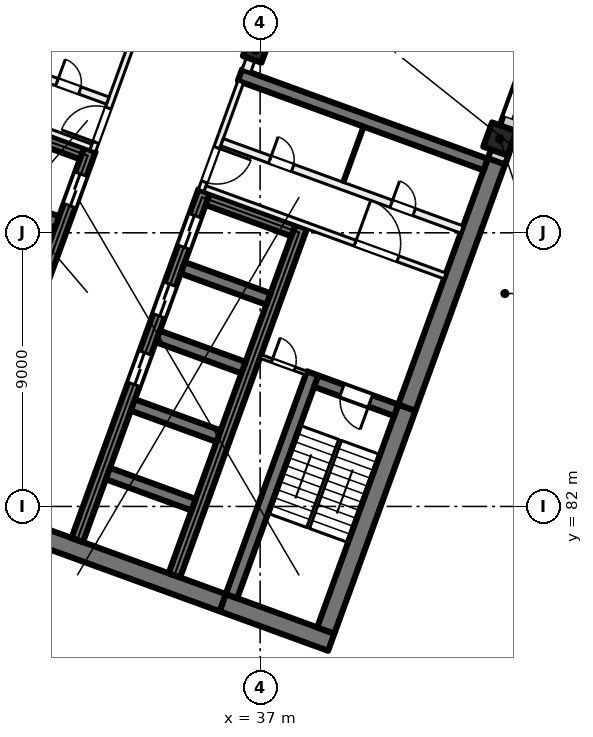
"""IFC4 building model, lengths in metres.
Left out: names, types, materials, properties, quantities, classifications, styles, units other than length and angle.
Written with IfcOpenShell. Run it as: python <this file> out.ifc"""

import sys

from ifc_helpers import new_model, si_unit, direction, frame, frame_2d, origin, origin_2d, place, context, subcontext, project, spatial, rectangle, extrude, element, fill, save


model = new_model("IFC4")
c1 = context("Model", 3, precision=1e-05, world=origin(), true_north=direction((0.0, 1.0)))
c2 = subcontext(c1, "Body", "Model", "MODEL_VIEW")
j1 = project(units=[si_unit("LENGTHUNIT", "METRE"), si_unit("PLANEANGLEUNIT", "RADIAN")], contexts=[c1])
p1 = place(None, origin())
s1 = spatial("IfcSite", under=j1, at=p1, CompositionType="ELEMENT")
p2 = place(p1, origin())
s2 = spatial("IfcBuilding", under=s1, at=p2, CompositionType="ELEMENT")
p3 = place(p2, frame((0.0, 0.0, 89.0)))
s3 = spatial("IfcBuildingStorey", under=s2, at=p3, CompositionType="ELEMENT", Elevation=89.0)
p4 = place(p3, frame((36.849, 97.011, 0.0), z_axis=(0.0, 0.0, 1.0), x_axis=(-0.342020143326, -0.939692620786, 0.0)))
e1 = element("IfcColumn", 1, at=p4, inside=s3, PredefinedType="COLUMN", context=c2, shape_type="SweptSolid", body=[
    extrude(rectangle(XDim=0.65, YDim=0.65, at=origin_2d()), origin(), (0.0, 0.0, 1.0), 4.0),
])
p5 = place(p3, frame((44.884, 94.087, 0.0), z_axis=(0.0, 0.0, 1.0), x_axis=(-0.342020143326, -0.939692620786, 0.0)))
e2 = element("IfcColumn", 2, at=p5, inside=s3, PredefinedType="COLUMN", context=c2, shape_type="SweptSolid", body=[
    extrude(rectangle(XDim=0.85, YDim=0.85, at=origin_2d()), origin(), (0.0, 0.0, 1.0), 4.0),
])
p6 = place(p3, frame((39.338, 77.535, 0.0), z_axis=(0.0, 0.0, 1.0), x_axis=(-0.939701471648, 0.341995824804, 0.0)))
e3 = element("IfcWall", 3, at=p6, inside=s3, PredefinedType="SHEAR", context=c2, shape_type="SweptSolid", body=[
    extrude(rectangle(XDim=3.8, YDim=0.6, at=frame_2d((1.9, 0.0))), origin(), (0.0, 0.0, 1.0), 4.0),
])
p7 = place(p3, frame((35.767, 78.835, 0.0), z_axis=(0.0, 0.0, 1.0), x_axis=(-0.939692894512, 0.342019391267, 0.0)))
e4 = element("IfcWall", 4, at=p7, inside=s3, PredefinedType="SHEAR", context=c2, shape_type="SweptSolid", body=[
    extrude(rectangle(XDim=14.4, YDim=0.6, at=frame_2d((7.2, 0.0))), origin(), (0.0, 0.0, 1.0), 4.0),
])
p8 = place(p3, frame((39.159, 77.92, 0.0), z_axis=(0.0, 0.0, 1.0), x_axis=(0.342016982193, 0.939693771338, 0.0)))
e5 = element("IfcWall", 5, at=p8, inside=s3, PredefinedType="SHEAR", context=c2, shape_type="SweptSolid", body=[
    extrude(rectangle(XDim=7.8, YDim=0.6, at=frame_2d((3.9, 0.0))), origin(), (0.0, 0.0, 1.0), 4.0),
])
p9 = place(p3, frame((41.827, 85.249, 0.0), z_axis=(0.0, 0.0, 1.0), x_axis=(0.342017595281, 0.939693548195, 0.0)))
e6 = element("IfcWall", 6, at=p9, inside=s3, PredefinedType="SHEAR", context=c2, shape_type="SweptSolid", body=[
    extrude(rectangle(XDim=8.925, YDim=0.6, at=frame_2d((4.462, 0.0))), origin(), (0.0, 0.0, 1.0), 4.0),
])
p10 = place(p3, frame((36.058, 79.048, 0.0), z_axis=(0.0, 0.0, 1.0), x_axis=(0.342016982193, 0.939693771338, 0.0)))
e7 = element("IfcWall", 7, at=p10, inside=s3, PredefinedType="SHEAR", context=c2, shape_type="SweptSolid", body=[
    extrude(rectangle(XDim=7.8, YDim=0.4, at=frame_2d((3.9, 0.0))), origin(), (0.0, 0.0, 1.0), 4.0),
])
p11 = place(p3, frame((41.476, 85.164, 0.0), z_axis=(0.0, 0.0, 1.0), x_axis=(-0.939678810556, 0.342058084236, 0.0)))
e8 = element("IfcWall", 8, at=p11, inside=s3, PredefinedType="SHEAR", context=c2, shape_type="SweptSolid", body=[
    extrude(rectangle(XDim=2.8, YDim=0.4, at=frame_2d((1.4, 0.0))), origin(), (0.0, 0.0, 1.0), 4.0),
])
p12 = place(p11, frame((0.9, 0.0, 0.0)))
e9 = element("IfcOpeningElement", 9, at=p12, cuts=e8, PredefinedType="OPENING", context=c2, shape_type="SweptSolid", body=[
    extrude(rectangle(XDim=1.0, YDim=2.1, at=frame_2d((0.5, 1.05))), frame((0.0, 0.21, 0.0), z_axis=(0.0, -1.0, 0.0), x_axis=(1.0, 0.0, 0.0)), (0.0, 0.0, 1.0), 0.42),
])
p13 = place(p3, frame((30.984, 80.895, 0.0), z_axis=(0.0, 0.0, 1.0), x_axis=(0.342021021735, 0.939692301071, 0.0)))
e10 = element("IfcWall", 10, at=p13, inside=s3, PredefinedType="SHEAR", context=c2, shape_type="SweptSolid", body=[
    extrude(rectangle(XDim=12.2, YDim=0.4, at=frame_2d((6.1, 0.0))), origin(), (0.0, 0.0, 1.0), 4.0),
])
p14 = place(p13, frame((5.45, 0.0, 0.0)))
e11 = element("IfcOpeningElement", 11, at=p14, cuts=e10, PredefinedType="OPENING", context=c2, shape_type="SweptSolid", body=[
    extrude(rectangle(XDim=1.1, YDim=2.1, at=frame_2d((0.55, 1.05))), frame((0.0, 0.21, 0.0), z_axis=(0.0, -1.0, 0.0), x_axis=(1.0, 0.0, 0.0)), (0.0, 0.0, 1.0), 0.42),
])
p15 = place(p13, frame((7.85, 0.0, 0.0)))
e12 = element("IfcOpeningElement", 12, at=p15, cuts=e10, PredefinedType="OPENING", context=c2, shape_type="SweptSolid", body=[
    extrude(rectangle(XDim=1.1, YDim=2.1, at=frame_2d((0.55, 1.05))), frame((0.0, 0.21, 0.0), z_axis=(0.0, -1.0, 0.0), x_axis=(1.0, 0.0, 0.0)), (0.0, 0.0, 1.0), 0.42),
])
p16 = place(p13, frame((10.25, 0.0, 0.0)))
e13 = element("IfcOpeningElement", 13, at=p16, cuts=e10, PredefinedType="OPENING", context=c2, shape_type="SweptSolid", body=[
    extrude(rectangle(XDim=1.1, YDim=2.1, at=frame_2d((0.55, 1.05))), frame((0.0, 0.21, 0.0), z_axis=(0.0, -1.0, 0.0), x_axis=(1.0, 0.0, 0.0)), (0.0, 0.0, 1.0), 0.42),
])
p17 = place(p3, frame((34.178, 79.732, 0.0), z_axis=(0.0, 0.0, 1.0), x_axis=(0.342014590177, 0.939694641948, 0.0)))
e14 = element("IfcWall", 14, at=p17, inside=s3, PredefinedType="SHEAR", context=c2, shape_type="SweptSolid", body=[
    extrude(rectangle(XDim=12.2, YDim=0.4, at=frame_2d((6.1, 0.0))), origin(), (0.0, 0.0, 1.0), 4.0),
])
for number, where, z_axis, x_axis in (
    (15, (34.812, 82.056, 0.0), (0.0, 0.0, 1.0), (-0.94, 0.342, 0.0)),
    (16, (35.632, 84.311, 0.0), (0.0, 0.0, 1.0), (-0.94, 0.342, 0.0)),
    (17, (36.453, 86.566, 0.0), (0.0, 0.0, 1.0), (-0.94, 0.342, 0.0)),
    (18, (37.274, 88.822, 0.0), (0.0, 0.0, 1.0), (-0.94, 0.342, 0.0)),
):
    element("IfcWall", number, at=place(p3, frame(where, z_axis=z_axis, x_axis=x_axis)), inside=s3, PredefinedType="SHEAR", context=c2, shape_type="SweptSolid", body=[
        extrude(rectangle(XDim=3.0, YDim=0.4, at=frame_2d((1.5, 0.0))), origin(), (0.0, 0.0, 1.0), 4.0),
    ])
p18 = place(p3, frame((38.095, 91.077, 0.0), z_axis=(0.0, 0.0, 1.0), x_axis=(-0.939676934218, 0.342063238742, 0.0)))
e19 = element("IfcWall", 19, at=p18, inside=s3, PredefinedType="SHEAR", context=c2, shape_type="SweptSolid", body=[
    extrude(rectangle(XDim=3.0, YDim=0.4, at=frame_2d((1.5, 0.0))), origin(), (0.0, 0.0, 1.0), 4.0),
])
p19 = place(p3, frame((27.225, 82.263, 0.0), z_axis=(0.0, 0.0, 1.0), x_axis=(0.342014590177, 0.939694641948, 0.0)))
e20 = element("IfcWall", 20, at=p19, inside=s3, PredefinedType="SHEAR", context=c2, shape_type="SweptSolid", body=[
    extrude(rectangle(XDim=12.2, YDim=0.4, at=frame_2d((6.1, 0.0))), origin(), (0.0, 0.0, 1.0), 4.0),
])
p20 = place(p19, frame((10.25, 0.0, 0.0)))
e21 = element("IfcOpeningElement", 21, at=p20, cuts=e20, PredefinedType="OPENING", context=c2, shape_type="SweptSolid", body=[
    extrude(rectangle(XDim=1.1, YDim=2.1, at=frame_2d((0.55, 1.05))), frame((0.0, 0.21, 0.0), z_axis=(0.0, -1.0, 0.0), x_axis=(1.0, 0.0, 0.0)), (0.0, 0.0, 1.0), 0.42),
])
p21 = place(p19, frame((0.7, 0.0, 0.0)))
e22 = element("IfcOpeningElement", 22, at=p21, cuts=e20, PredefinedType="OPENING", context=c2, shape_type="SweptSolid", body=[
    extrude(rectangle(XDim=0.8, YDim=2.1, at=frame_2d((0.4, 1.05))), frame((0.0, 0.21, 0.0), z_axis=(0.0, -1.0, 0.0), x_axis=(1.0, 0.0, 0.0)), (0.0, 0.0, 1.0), 0.42),
])
for number, where, z_axis, x_axis in (
    (23, (30.32, 91.353, 0.0), (0.0, 0.0, 1.0), (-0.94, 0.342, 0.0)),
    (24, (31.141, 93.608, 0.0), (0.0, 0.0, 1.0), (-0.94, 0.342, 0.0)),
):
    element("IfcWall", number, at=place(p3, frame(where, z_axis=z_axis, x_axis=x_axis)), inside=s3, PredefinedType="SHEAR", context=c2, shape_type="SweptSolid", body=[
        extrude(rectangle(XDim=3.0, YDim=0.4, at=frame_2d((1.5, 0.0))), origin(), (0.0, 0.0, 1.0), 4.0),
    ])
p22 = place(p3, frame((44.418, 93.245, 0.0), z_axis=(0.0, 0.0, 1.0), x_axis=(-0.93969060187, 0.342025690201, 0.0)))
e25 = element("IfcWall", 25, at=p22, inside=s3, PredefinedType="SHEAR", context=c2, shape_type="SweptSolid", body=[
    extrude(rectangle(XDim=8.6, YDim=0.4, at=frame_2d((4.3, 0.0))), origin(), (0.0, 0.0, 1.0), 4.0),
])
p23 = place(p3, frame((52.212, 113.783, 0.0), z_axis=(0.0, 0.0, 1.0), x_axis=(-0.34202521188, -0.939690775968, 0.0)))
e26 = element("IfcWall", 26, at=p23, inside=s3, PredefinedType="SOLIDWALL", context=c2, shape_type="SweptSolid", body=[
    extrude(rectangle(XDim=21.745, YDim=0.6, at=frame_2d((10.873, 0.0))), origin(), (0.0, 0.0, 1.0), 3.625),
])
p24 = place(p23, frame((3.765, 0.0, 0.9)))
e27 = element("IfcOpeningElement", 27, at=p24, cuts=e26, PredefinedType="OPENING", context=c2, shape_type="SweptSolid", body=[
    extrude(rectangle(XDim=3.0, YDim=2.4, at=frame_2d((1.5, 1.2))), frame((0.0, 0.31, 0.0), z_axis=(0.0, -1.0, 0.0), x_axis=(1.0, 0.0, 0.0)), (0.0, 0.0, 1.0), 0.62),
])
p25 = place(p23, frame((8.265, 0.0, 0.9)))
e28 = element("IfcOpeningElement", 28, at=p25, cuts=e26, PredefinedType="OPENING", context=c2, shape_type="SweptSolid", body=[
    extrude(rectangle(XDim=3.0, YDim=2.4, at=frame_2d((1.5, 1.2))), frame((0.0, 0.31, 0.0), z_axis=(0.0, -1.0, 0.0), x_axis=(1.0, 0.0, 0.0)), (0.0, 0.0, 1.0), 0.62),
])
p26 = place(p23, frame((12.765, 0.0, 0.9)))
e29 = element("IfcOpeningElement", 29, at=p26, cuts=e26, PredefinedType="OPENING", context=c2, shape_type="SweptSolid", body=[
    extrude(rectangle(XDim=3.0, YDim=2.4, at=frame_2d((1.5, 1.2))), frame((0.0, 0.31, 0.0), z_axis=(0.0, -1.0, 0.0), x_axis=(1.0, 0.0, 0.0)), (0.0, 0.0, 1.0), 0.62),
])
p27 = place(p23, frame((17.265, 0.0, 0.9)))
e30 = element("IfcOpeningElement", 30, at=p27, cuts=e26, PredefinedType="OPENING", context=c2, shape_type="SweptSolid", body=[
    extrude(rectangle(XDim=3.0, YDim=2.4, at=frame_2d((1.5, 1.2))), frame((0.0, 0.31, 0.0), z_axis=(0.0, -1.0, 0.0), x_axis=(1.0, 0.0, 0.0)), (0.0, 0.0, 1.0), 0.62),
])
p28 = place(p3, frame((31.491, 93.693, 0.0), z_axis=(0.0, 0.0, 1.0), x_axis=(0.341995824804, 0.939701471648, 0.0)))
e31 = element("IfcWall", 31, at=p28, inside=s3, PredefinedType="PARTITIONING", context=c2, shape_type="SweptSolid", body=[
    extrude(rectangle(XDim=3.8, YDim=0.2, at=frame_2d((1.9, 0.0))), origin(), (0.0, 0.0, 1.0), 3.625),
])
p29 = place(p28, frame((0.3, 0.0, 0.0)))
e32 = element("IfcOpeningElement", 32, at=p29, cuts=e31, PredefinedType="OPENING", context=c2, shape_type="SweptSolid", body=[
    extrude(rectangle(XDim=1.2, YDim=2.1, at=frame_2d((0.6, 1.05))), frame((0.0, 0.11, 0.0), z_axis=(0.0, -1.0, 0.0), x_axis=(1.0, 0.0, 0.0)), (0.0, 0.0, 1.0), 0.22),
])
p30 = place(p3, frame((23.538, 96.694, 0.0), z_axis=(0.0, 0.0, 1.0), x_axis=(0.939691552312, -0.342023078919, 0.0)))
e33 = element("IfcWall", 33, at=p30, inside=s3, PredefinedType="PARTITIONING", context=c2, shape_type="SweptSolid", body=[
    extrude(rectangle(XDim=8.4, YDim=0.2, at=frame_2d((4.2, 0.0))), origin(), (0.0, 0.0, 1.0), 3.625),
])
p31 = place(p30, frame((1.65, 0.0, 0.0)))
e34 = element("IfcOpeningElement", 34, at=p31, cuts=e33, PredefinedType="OPENING", context=c2, shape_type="SweptSolid", body=[
    extrude(rectangle(XDim=1.5, YDim=2.1, at=frame_2d((0.75, 1.05))), frame((0.0, 0.11, 0.0), z_axis=(0.0, -1.0, 0.0), x_axis=(1.0, 0.0, 0.0)), (0.0, 0.0, 1.0), 0.22),
])
p32 = place(p3, frame((24.094, 98.221, 0.0), z_axis=(0.0, 0.0, 1.0), x_axis=(0.939691552312, -0.342023078919, 0.0)))
e35 = element("IfcWall", 35, at=p32, inside=s3, PredefinedType="PARTITIONING", context=c2, shape_type="SweptSolid", body=[
    extrude(rectangle(XDim=8.4, YDim=0.25, at=frame_2d((4.2, 0.0))), origin(), (0.0, 0.0, 1.0), 3.625),
])
p33 = place(p32, frame((6.625, 0.0, 0.0)))
e36 = element("IfcOpeningElement", 36, at=p33, cuts=e35, PredefinedType="OPENING", context=c2, shape_type="SweptSolid", body=[
    extrude(rectangle(XDim=0.8, YDim=2.1, at=frame_2d((0.4, 1.05))), frame((0.0, 0.135, 0.0), z_axis=(0.0, -1.0, 0.0), x_axis=(1.0, 0.0, 0.0)), (0.0, 0.0, 1.0), 0.27),
])
p34 = place(p32, frame((2.375, 0.0, 0.0)))
e37 = element("IfcOpeningElement", 37, at=p34, cuts=e35, PredefinedType="OPENING", context=c2, shape_type="SweptSolid", body=[
    extrude(rectangle(XDim=0.8, YDim=2.1, at=frame_2d((0.4, 1.05))), frame((0.0, 0.135, 0.0), z_axis=(0.0, -1.0, 0.0), x_axis=(1.0, 0.0, 0.0)), (0.0, 0.0, 1.0), 0.27),
])
p35 = place(p3, frame((36.362, 95.964, 0.0), z_axis=(0.0, 0.0, 1.0), x_axis=(-0.341995824804, -0.939701471648, 0.0)))
e38 = element("IfcWall", 38, at=p35, inside=s3, PredefinedType="PARTITIONING", context=c2, shape_type="SweptSolid", body=[
    extrude(rectangle(XDim=3.8, YDim=0.2, at=frame_2d((1.9, 0.0))), origin(), (0.0, 0.0, 1.0), 3.625),
])
p36 = place(p35, frame((2.3, 0.0, 0.0)))
e39 = element("IfcOpeningElement", 39, at=p36, cuts=e38, PredefinedType="OPENING", context=c2, shape_type="SweptSolid", body=[
    extrude(rectangle(XDim=1.2, YDim=2.1, at=frame_2d((0.6, 1.05))), frame((0.0, 0.11, 0.0), z_axis=(0.0, -1.0, 0.0), x_axis=(1.0, 0.0, 0.0)), (0.0, 0.0, 1.0), 0.22),
])
p37 = place(p3, frame((35.19, 92.453, 0.0), z_axis=(0.0, 0.0, 1.0), x_axis=(0.939691552312, -0.342023078919, 0.0)))
e40 = element("IfcWall", 40, at=p37, inside=s3, PredefinedType="PARTITIONING", context=c2, shape_type="SweptSolid", body=[
    extrude(rectangle(XDim=8.4, YDim=0.2, at=frame_2d((4.2, 0.0))), origin(), (0.0, 0.0, 1.0), 3.625),
])
p38 = place(p37, frame((5.25, 0.0, 0.0)))
e41 = element("IfcOpeningElement", 41, at=p38, cuts=e40, PredefinedType="OPENING", context=c2, shape_type="SweptSolid", body=[
    extrude(rectangle(XDim=1.5, YDim=2.1, at=frame_2d((0.75, 1.05))), frame((0.0, 0.11, 0.0), z_axis=(0.0, -1.0, 0.0), x_axis=(1.0, 0.0, 0.0)), (0.0, 0.0, 1.0), 0.22),
])
p39 = place(p3, frame((35.746, 93.98, 0.0), z_axis=(0.0, 0.0, 1.0), x_axis=(0.939691552312, -0.342023078919, 0.0)))
e42 = element("IfcWall", 42, at=p39, inside=s3, PredefinedType="PARTITIONING", context=c2, shape_type="SweptSolid", body=[
    extrude(rectangle(XDim=8.4, YDim=0.25, at=frame_2d((4.2, 0.0))), origin(), (0.0, 0.0, 1.0), 3.625),
])
p40 = place(p39, frame((1.675, 0.0, 0.0)))
e43 = element("IfcOpeningElement", 43, at=p40, cuts=e42, PredefinedType="OPENING", context=c2, shape_type="SweptSolid", body=[
    extrude(rectangle(XDim=0.8, YDim=2.1, at=frame_2d((0.4, 1.05))), frame((0.0, 0.135, 0.0), z_axis=(0.0, -1.0, 0.0), x_axis=(1.0, 0.0, 0.0)), (0.0, 0.0, 1.0), 0.27),
])
p41 = place(p39, frame((5.925, 0.0, 0.0)))
e44 = element("IfcOpeningElement", 44, at=p41, cuts=e42, PredefinedType="OPENING", context=c2, shape_type="SweptSolid", body=[
    extrude(rectangle(XDim=0.8, YDim=2.1, at=frame_2d((0.4, 1.05))), frame((0.0, 0.135, 0.0), z_axis=(0.0, -1.0, 0.0), x_axis=(1.0, 0.0, 0.0)), (0.0, 0.0, 1.0), 0.27),
])
p42 = place(p3, frame((37.013, 86.935, 0.0), z_axis=(0.0, 0.0, 1.0), x_axis=(0.939659694648, -0.342110593602, 0.0)))
e45 = element("IfcWall", 45, at=p42, inside=s3, PredefinedType="PARTITIONING", context=c2, shape_type="SweptSolid", body=[
    extrude(rectangle(XDim=1.6, YDim=0.125, at=frame_2d((0.8, 0.0))), origin(), (0.0, 0.0, 1.0), 3.625),
])
p43 = place(p42, frame((0.4, 0.0, 0.0)))
e46 = element("IfcOpeningElement", 46, at=p43, cuts=e45, PredefinedType="OPENING", context=c2, shape_type="SweptSolid", body=[
    extrude(rectangle(XDim=0.8, YDim=2.1, at=frame_2d((0.4, 1.05))), frame((0.0, 0.073, 0.0), z_axis=(0.0, -1.0, 0.0), x_axis=(1.0, 0.0, 0.0)), (0.0, 0.0, 1.0), 0.145),
])
p44 = place(p3, frame((40.403, 94.494, 0.0), z_axis=(0.0, 0.0, 1.0), x_axis=(-0.342064742067, -0.939676386973, 0.0)))
e47 = element("IfcWall", 47, at=p44, inside=s3, PredefinedType="PARTITIONING", context=c2, shape_type="SweptSolid", body=[
    extrude(rectangle(XDim=1.95, YDim=0.1, at=frame_2d((0.975, 0.0))), origin(), (0.0, 0.0, 1.0), 3.625),
])
p45 = place(p3, frame((47.314, 125.909, 0.0), z_axis=(0.0, 0.0, 1.0), x_axis=(-0.342010770371, -0.939696032209, 0.0)))
e48 = element("IfcWall", 48, at=p45, inside=s3, PredefinedType="PARTITIONING", context=c2, shape_type="SweptSolid", body=[
    extrude(rectangle(XDim=31.485, YDim=0.3, at=frame_2d((15.742, 0.0))), origin(), (0.0, 0.0, 1.0), 3.625),
])
p46 = place(p45, frame((22.21, 0.0, 0.0)))
e49 = element("IfcOpeningElement", 49, at=p46, cuts=e48, PredefinedType="OPENING", context=c2, shape_type="SweptSolid", body=[
    extrude(rectangle(XDim=1.8, YDim=2.1, at=frame_2d((0.9, 1.05))), frame((0.0, 0.16, 0.0), z_axis=(0.0, -1.0, 0.0), x_axis=(1.0, 0.0, 0.0)), (0.0, 0.0, 1.0), 0.32),
])
p47 = place(p45, frame((9.885, 0.0, 0.0)))
e50 = element("IfcOpeningElement", 50, at=p47, cuts=e48, PredefinedType="OPENING", context=c2, shape_type="SweptSolid", body=[
    extrude(rectangle(XDim=1.2, YDim=2.1, at=frame_2d((0.6, 1.05))), frame((0.0, 0.16, 0.0), z_axis=(0.0, -1.0, 0.0), x_axis=(1.0, 0.0, 0.0)), (0.0, 0.0, 1.0), 0.32),
])
p48 = place(p45, frame((5.484, 0.0, 0.0)))
e51 = element("IfcOpeningElement", 51, at=p48, cuts=e48, PredefinedType="OPENING", context=c2, shape_type="SweptSolid", body=[
    extrude(rectangle(XDim=1.0, YDim=2.1, at=frame_2d((0.5, 1.05))), frame((0.0, 0.16, 0.0), z_axis=(0.0, -1.0, 0.0), x_axis=(1.0, 0.0, 0.0)), (0.0, 0.0, 1.0), 0.32),
])
p49 = place(p27, origin())
e52 = element("IfcWindow", 52, at=p49, inside=s3, PartitioningType="SINGLE_PANEL", PredefinedType="WINDOW", context=c2, shape_type="SweptSolid", body=[
    extrude(rectangle(XDim=3.0, YDim=2.4, at=frame_2d((1.5, 1.2))), frame((0.0, 0.03, 0.0), z_axis=(0.0, -1.0, 0.0), x_axis=(1.0, 0.0, 0.0)), (0.0, 0.0, 1.0), 0.06),
])
fill(e30, e52)
p50 = place(p20, origin())
e53 = element("IfcDoor", 53, at=p50, inside=s3, OperationType="DOUBLE_DOOR_SLIDING", PredefinedType="DOOR", context=c2, shape_type="SweptSolid", body=[
    extrude(rectangle(XDim=1.1, YDim=2.1, at=frame_2d((0.55, 1.05))), frame((0.0, 0.025, 0.0), z_axis=(0.0, -1.0, 0.0), x_axis=(1.0, 0.0, 0.0)), (0.0, 0.0, 1.0), 0.05),
])
fill(e21, e53)
p51 = place(p14, origin())
e54 = element("IfcDoor", 54, at=p51, inside=s3, OperationType="DOUBLE_DOOR_SLIDING", PredefinedType="DOOR", context=c2, shape_type="SweptSolid", body=[
    extrude(rectangle(XDim=1.1, YDim=2.1, at=frame_2d((0.55, 1.05))), frame((0.0, 0.025, 0.0), z_axis=(0.0, -1.0, 0.0), x_axis=(1.0, 0.0, 0.0)), (0.0, 0.0, 1.0), 0.05),
])
fill(e11, e54)
p52 = place(p15, origin())
e55 = element("IfcDoor", 55, at=p52, inside=s3, OperationType="DOUBLE_DOOR_SLIDING", PredefinedType="DOOR", context=c2, shape_type="SweptSolid", body=[
    extrude(rectangle(XDim=1.1, YDim=2.1, at=frame_2d((0.55, 1.05))), frame((0.0, 0.025, 0.0), z_axis=(0.0, -1.0, 0.0), x_axis=(1.0, 0.0, 0.0)), (0.0, 0.0, 1.0), 0.05),
])
fill(e12, e55)
p53 = place(p16, origin())
e56 = element("IfcDoor", 56, at=p53, inside=s3, OperationType="DOUBLE_DOOR_SLIDING", PredefinedType="DOOR", context=c2, shape_type="SweptSolid", body=[
    extrude(rectangle(XDim=1.1, YDim=2.1, at=frame_2d((0.55, 1.05))), frame((0.0, 0.025, 0.0), z_axis=(0.0, -1.0, 0.0), x_axis=(1.0, 0.0, 0.0)), (0.0, 0.0, 1.0), 0.05),
])
fill(e13, e56)
p54 = place(p29, origin())
e57 = element("IfcDoor", 57, at=p54, inside=s3, OperationType="DOUBLE_DOOR_SINGLE_SWING", PredefinedType="DOOR", context=c2, shape_type="SweptSolid", body=[
    extrude(rectangle(XDim=1.2, YDim=2.1, at=frame_2d((0.6, 1.05))), frame((0.0, 0.025, 0.0), z_axis=(0.0, -1.0, 0.0), x_axis=(1.0, 0.0, 0.0)), (0.0, 0.0, 1.0), 0.05),
])
fill(e32, e57)
p55 = place(p33, origin())
e58 = element("IfcDoor", 58, at=p55, inside=s3, OperationType="SINGLE_SWING_LEFT", PredefinedType="DOOR", context=c2, shape_type="SweptSolid", body=[
    extrude(rectangle(XDim=0.8, YDim=2.1, at=frame_2d((0.4, 1.05))), frame((0.0, 0.025, 0.0), z_axis=(0.0, -1.0, 0.0), x_axis=(1.0, 0.0, 0.0)), (0.0, 0.0, 1.0), 0.05),
])
fill(e36, e58)
p56 = place(p36, origin())
e59 = element("IfcDoor", 59, at=p56, inside=s3, OperationType="DOUBLE_DOOR_SINGLE_SWING", PredefinedType="DOOR", context=c2, shape_type="SweptSolid", body=[
    extrude(rectangle(XDim=1.2, YDim=2.1, at=frame_2d((0.6, 1.05))), frame((0.0, 0.025, 0.0), z_axis=(0.0, -1.0, 0.0), x_axis=(1.0, 0.0, 0.0)), (0.0, 0.0, 1.0), 0.05),
])
fill(e39, e59)
p57 = place(p38, origin())
e60 = element("IfcDoor", 60, at=p57, inside=s3, OperationType="DOUBLE_DOOR_SINGLE_SWING", PredefinedType="DOOR", context=c2, shape_type="SweptSolid", body=[
    extrude(rectangle(XDim=1.5, YDim=2.1, at=frame_2d((0.75, 1.05))), frame((0.0, 0.025, 0.0), z_axis=(0.0, -1.0, 0.0), x_axis=(1.0, 0.0, 0.0)), (0.0, 0.0, 1.0), 0.05),
])
fill(e41, e60)
p58 = place(p12, origin())
e61 = element("IfcDoor", 61, at=p58, inside=s3, OperationType="SINGLE_SWING_RIGHT", PredefinedType="DOOR", context=c2, shape_type="SweptSolid", body=[
    extrude(rectangle(XDim=1.0, YDim=2.1, at=frame_2d((0.5, 1.05))), frame((0.0, 0.025, 0.0), z_axis=(0.0, -1.0, 0.0), x_axis=(1.0, 0.0, 0.0)), (0.0, 0.0, 1.0), 0.05),
])
fill(e9, e61)
p59 = place(p43, origin())
e62 = element("IfcDoor", 62, at=p59, inside=s3, OperationType="SINGLE_SWING_LEFT", PredefinedType="DOOR", context=c2, shape_type="SweptSolid", body=[
    extrude(rectangle(XDim=0.8, YDim=2.1, at=frame_2d((0.4, 1.05))), frame((0.0, 0.025, 0.0), z_axis=(0.0, -1.0, 0.0), x_axis=(1.0, 0.0, 0.0)), (0.0, 0.0, 1.0), 0.05),
])
fill(e46, e62)
p60 = place(p40, origin())
e63 = element("IfcDoor", 63, at=p60, inside=s3, OperationType="SINGLE_SWING_RIGHT", PredefinedType="DOOR", context=c2, shape_type="SweptSolid", body=[
    extrude(rectangle(XDim=0.8, YDim=2.1, at=frame_2d((0.4, 1.05))), frame((0.0, 0.025, 0.0), z_axis=(0.0, -1.0, 0.0), x_axis=(1.0, 0.0, 0.0)), (0.0, 0.0, 1.0), 0.05),
])
fill(e43, e63)
p61 = place(p41, origin())
e64 = element("IfcDoor", 64, at=p61, inside=s3, OperationType="SINGLE_SWING_LEFT", PredefinedType="DOOR", context=c2, shape_type="SweptSolid", body=[
    extrude(rectangle(XDim=0.8, YDim=2.1, at=frame_2d((0.4, 1.05))), frame((0.0, 0.025, 0.0), z_axis=(0.0, -1.0, 0.0), x_axis=(1.0, 0.0, 0.0)), (0.0, 0.0, 1.0), 0.05),
])
fill(e44, e64)
save(model, sys.argv[1])
